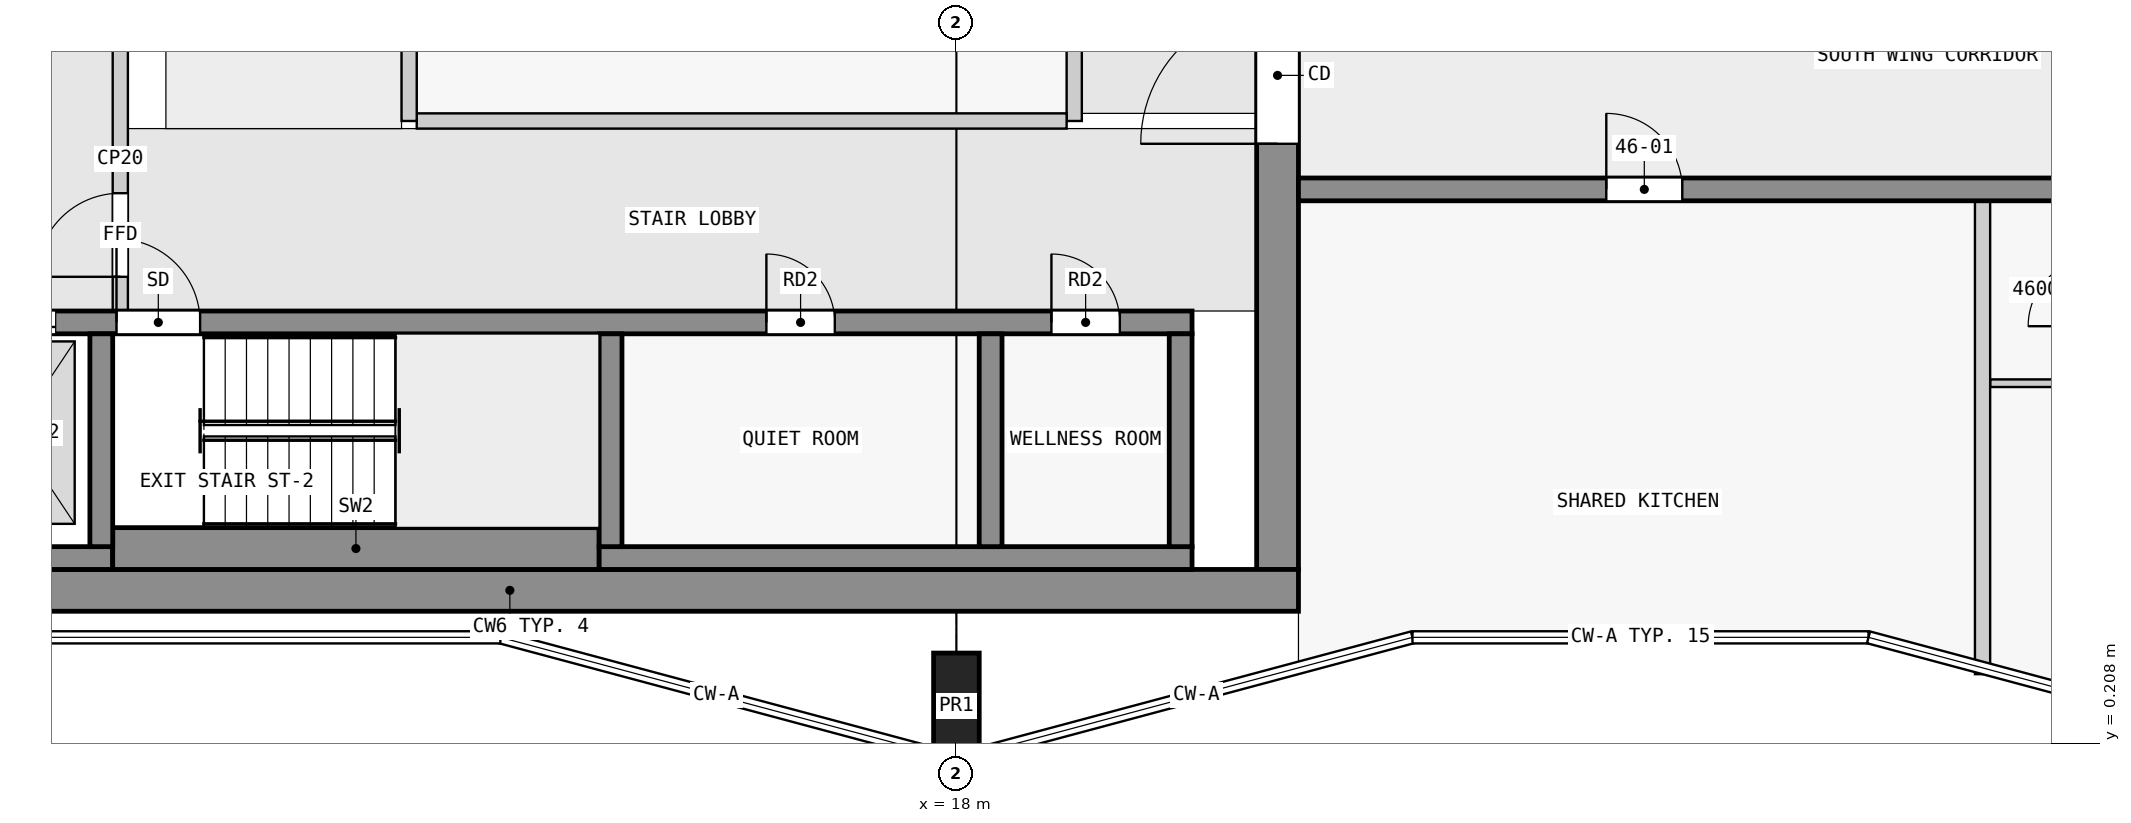
"""IFC4 building model, lengths in metres.
Left out: names, types, materials, properties, quantities, classifications, styles, units other than length and angle.
Written with IfcOpenShell. Run it as: python <this file> out.ifc"""

import sys

from ifc_helpers import new_model, si_unit, direction, frame, frame_2d, origin, origin_2d, place, context, subcontext, project, spatial, rectangle, extrude, element, fill, save


model = new_model("IFC4")
c1 = context("Model", 3, precision=1e-05, world=origin(), true_north=direction((0.0, 1.0)))
c2 = subcontext(c1, "Body", "Model", "MODEL_VIEW")
j1 = project(units=[si_unit("LENGTHUNIT", "METRE"), si_unit("PLANEANGLEUNIT", "RADIAN")], contexts=[c1])
p1 = place(None, origin())
s1 = spatial("IfcSite", under=j1, at=p1, CompositionType="ELEMENT")
p2 = place(p1, origin())
s2 = spatial("IfcBuilding", under=s1, at=p2, CompositionType="ELEMENT")
p3 = place(p2, frame((0.0, 0.0, 177.9)))
s3 = spatial("IfcBuildingStorey", under=s2, at=p3, CompositionType="ELEMENT", Elevation=177.9)
p4 = place(p3, frame((18.0, 0.7, 0.0), z_axis=(0.0, 0.0, 1.0), x_axis=(1.0, 0.0, 0.0)))
e1 = element("IfcColumn", 1, at=p4, inside=s3, PredefinedType="COLUMN", context=c2, shape_type="SweptSolid", body=[
    extrude(rectangle(XDim=0.6, YDim=1.4, at=origin_2d()), origin(), (0.0, 0.0, 1.0), 3.5),
])
p5 = place(p3, frame((1.75, 2.225, 0.0), z_axis=(0.0, 0.0, 1.0), x_axis=(1.0, 0.0, 0.0)))
e2 = element("IfcWall", 2, at=p5, inside=s3, PredefinedType="SHEAR", context=c2, shape_type="SweptSolid", body=[
    extrude(rectangle(XDim=20.75, YDim=0.55, at=frame_2d((10.375, 0.0))), origin(), (0.0, 0.0, 1.0), 3.25),
])
p6 = place(p3, frame((22.225, 2.5, 0.0), z_axis=(0.0, 0.0, 1.0), x_axis=(0.0, 1.0, 0.0)))
e3 = element("IfcWall", 3, at=p6, inside=s3, PredefinedType="SHEAR", context=c2, shape_type="SweptSolid", body=[
    extrude(rectangle(XDim=14.95, YDim=0.55, at=frame_2d((7.475, 0.0))), origin(), (0.0, 0.0, 1.0), 3.25),
])
p7 = place(p6, frame((5.6, 0.0, 0.0)))
e4 = element("IfcOpeningElement", 4, at=p7, cuts=e3, PredefinedType="OPENING", context=c2, shape_type="SweptSolid", body=[
    extrude(rectangle(XDim=1.8, YDim=2.1, at=frame_2d((0.9, 1.05))), frame((0.0, 0.285, 0.0), z_axis=(0.0, -1.0, 0.0), x_axis=(1.0, 0.0, 0.0)), (0.0, 0.0, 1.0), 0.57),
])
p8 = place(p3, frame((2.3, 2.65, 0.0), z_axis=(0.0, 0.0, 1.0), x_axis=(1.0, 0.0, 0.0)))
e5 = element("IfcWall", 5, at=p8, inside=s3, PredefinedType="SHEAR", context=c2, shape_type="SweptSolid", body=[
    extrude(rectangle(XDim=4.6, YDim=0.3, at=frame_2d((2.3, 0.0))), origin(), (0.0, 0.0, 1.0), 3.25),
])
p9 = place(p3, frame((6.9, 2.775, 0.0), z_axis=(0.0, 0.0, 1.0), x_axis=(1.0, 0.0, 0.0)))
e6 = element("IfcWall", 6, at=p9, inside=s3, PredefinedType="SHEAR", context=c2, shape_type="SweptSolid", body=[
    extrude(rectangle(XDim=6.4, YDim=0.55, at=frame_2d((3.2, 0.0))), origin(), (0.0, 0.0, 1.0), 3.25),
])
p10 = place(p3, frame((13.3, 2.65, 0.0), z_axis=(0.0, 0.0, 1.0), x_axis=(1.0, 0.0, 0.0)))
e7 = element("IfcWall", 7, at=p10, inside=s3, PredefinedType="SHEAR", context=c2, shape_type="SweptSolid", body=[
    extrude(rectangle(XDim=7.8, YDim=0.3, at=frame_2d((3.9, 0.0))), origin(), (0.0, 0.0, 1.0), 3.25),
])
for number, where, z_axis, x_axis in (
    (8, (6.75, 2.8, 0.0), (0.0, 0.0, 1.0), (0.0, 1.0, 0.0)),
    (9, (13.45, 2.8, 0.0), (0.0, 0.0, 1.0), (0.0, 1.0, 0.0)),
    (10, (18.45, 2.8, 0.0), (0.0, 0.0, 1.0), (0.0, 1.0, 0.0)),
    (11, (20.95, 2.8, 0.0), (0.0, 0.0, 1.0), (0.0, 1.0, 0.0)),
):
    element("IfcWall", number, at=place(p3, frame(where, z_axis=z_axis, x_axis=x_axis)), inside=s3, PredefinedType="SHEAR", context=c2, shape_type="SweptSolid", body=[
        extrude(rectangle(XDim=2.8, YDim=0.3, at=frame_2d((1.4, 0.0))), origin(), (0.0, 0.0, 1.0), 3.25),
    ])
p11 = place(p3, frame((2.3, 5.75, 0.0), z_axis=(0.0, 0.0, 1.0), x_axis=(1.0, 0.0, 0.0)))
e12 = element("IfcWall", 12, at=p11, inside=s3, PredefinedType="SHEAR", context=c2, shape_type="SweptSolid", body=[
    extrude(rectangle(XDim=18.8, YDim=0.3, at=frame_2d((9.4, 0.0))), origin(), (0.0, 0.0, 1.0), 3.25),
])
p12 = place(p11, frame((4.65, 0.0, 0.0)))
e13 = element("IfcOpeningElement", 13, at=p12, cuts=e12, PredefinedType="OPENING", context=c2, shape_type="SweptSolid", body=[
    extrude(rectangle(XDim=1.1, YDim=2.1, at=frame_2d((0.55, 1.05))), frame((0.0, 0.16, 0.0), z_axis=(0.0, -1.0, 0.0), x_axis=(1.0, 0.0, 0.0)), (0.0, 0.0, 1.0), 0.32),
])
p13 = place(p11, frame((0.45, 0.0, 0.0)))
e14 = element("IfcOpeningElement", 14, at=p13, cuts=e12, PredefinedType="OPENING", context=c2, shape_type="SweptSolid", body=[
    extrude(rectangle(XDim=1.1, YDim=2.1, at=frame_2d((0.55, 1.05))), frame((0.0, 0.16, 0.0), z_axis=(0.0, -1.0, 0.0), x_axis=(1.0, 0.0, 0.0)), (0.0, 0.0, 1.0), 0.32),
])
p14 = place(p11, frame((2.75, 0.0, 0.0)))
e15 = element("IfcOpeningElement", 15, at=p14, cuts=e12, PredefinedType="OPENING", context=c2, shape_type="SweptSolid", body=[
    extrude(rectangle(XDim=1.1, YDim=2.1, at=frame_2d((0.55, 1.05))), frame((0.0, 0.16, 0.0), z_axis=(0.0, -1.0, 0.0), x_axis=(1.0, 0.0, 0.0)), (0.0, 0.0, 1.0), 0.32),
])
p15 = place(p11, frame((13.2, 0.0, 0.0)))
e16 = element("IfcOpeningElement", 16, at=p15, cuts=e12, PredefinedType="OPENING", context=c2, shape_type="SweptSolid", body=[
    extrude(rectangle(XDim=0.9, YDim=2.1, at=frame_2d((0.45, 1.05))), frame((0.0, 0.16, 0.0), z_axis=(0.0, -1.0, 0.0), x_axis=(1.0, 0.0, 0.0)), (0.0, 0.0, 1.0), 0.32),
])
p16 = place(p11, frame((16.95, 0.0, 0.0)))
e17 = element("IfcOpeningElement", 17, at=p16, cuts=e12, PredefinedType="OPENING", context=c2, shape_type="SweptSolid", body=[
    extrude(rectangle(XDim=0.9, YDim=2.1, at=frame_2d((0.45, 1.05))), frame((0.0, 0.16, 0.0), z_axis=(0.0, -1.0, 0.0), x_axis=(1.0, 0.0, 0.0)), (0.0, 0.0, 1.0), 0.32),
])
p17 = place(p3, frame((22.5, 7.5, 0.0), z_axis=(0.0, 0.0, 1.0), x_axis=(1.0, 0.0, 0.0)))
e18 = element("IfcWall", 18, at=p17, inside=s3, PredefinedType="SHEAR", context=c2, shape_type="SweptSolid", body=[
    extrude(rectangle(XDim=22.5, YDim=0.3, at=frame_2d((11.25, 0.0))), origin(), (0.0, 0.0, 1.0), 3.25),
])
p18 = place(p17, frame((4.05, 0.0, 0.0)))
e19 = element("IfcOpeningElement", 19, at=p18, cuts=e18, PredefinedType="OPENING", context=c2, shape_type="SweptSolid", body=[
    extrude(rectangle(XDim=1.0, YDim=2.1, at=frame_2d((0.5, 1.05))), frame((0.0, 0.16, 0.0), z_axis=(0.0, -1.0, 0.0), x_axis=(1.0, 0.0, 0.0)), (0.0, 0.0, 1.0), 0.32),
])
p19 = place(p17, frame((10.75, 0.0, 0.0)))
e20 = element("IfcOpeningElement", 20, at=p19, cuts=e18, PredefinedType="OPENING", context=c2, shape_type="SweptSolid", body=[
    extrude(rectangle(XDim=1.0, YDim=2.1, at=frame_2d((0.5, 1.05))), frame((0.0, 0.16, 0.0), z_axis=(0.0, -1.0, 0.0), x_axis=(1.0, 0.0, 0.0)), (0.0, 0.0, 1.0), 0.32),
])
p20 = place(p17, frame((15.35, 0.0, 0.0)))
e21 = element("IfcOpeningElement", 21, at=p20, cuts=e18, PredefinedType="OPENING", context=c2, shape_type="SweptSolid", body=[
    extrude(rectangle(XDim=0.9, YDim=2.1, at=frame_2d((0.45, 1.05))), frame((0.0, 0.16, 0.0), z_axis=(0.0, -1.0, 0.0), x_axis=(1.0, 0.0, 0.0)), (0.0, 0.0, 1.0), 0.32),
])
p21 = place(p17, frame((18.75, 0.0, 0.0)))
e22 = element("IfcOpeningElement", 22, at=p21, cuts=e18, PredefinedType="OPENING", context=c2, shape_type="SweptSolid", body=[
    extrude(rectangle(XDim=0.9, YDim=2.1, at=frame_2d((0.45, 1.05))), frame((0.0, 0.16, 0.0), z_axis=(0.0, -1.0, 0.0), x_axis=(1.0, 0.0, 0.0)), (0.0, 0.0, 1.0), 0.32),
])
p22 = place(p17, frame((20.95, 0.0, 0.0)))
e23 = element("IfcOpeningElement", 23, at=p22, cuts=e18, PredefinedType="OPENING", context=c2, shape_type="SweptSolid", body=[
    extrude(rectangle(XDim=1.0, YDim=2.1, at=frame_2d((0.5, 1.05))), frame((0.0, 0.16, 0.0), z_axis=(0.0, -1.0, 0.0), x_axis=(1.0, 0.0, 0.0)), (0.0, 0.0, 1.0), 0.32),
])
p23 = place(p3, frame((7.0, 5.9, 0.0), z_axis=(0.0, 0.0, 1.0), x_axis=(0.0, 1.0, 0.0)))
e24 = element("IfcWall", 24, at=p23, inside=s3, PredefinedType="PARTITIONING", context=c2, shape_type="SweptSolid", body=[
    extrude(rectangle(XDim=4.0, YDim=0.2, at=frame_2d((2.0, 0.0))), origin(), (0.0, 0.0, 1.0), 3.25),
])
p24 = place(p23, frame((0.45, 0.0, 0.0)))
e25 = element("IfcOpeningElement", 25, at=p24, cuts=e24, PredefinedType="OPENING", context=c2, shape_type="SweptSolid", body=[
    extrude(rectangle(XDim=1.1, YDim=2.1, at=frame_2d((0.55, 1.05))), frame((0.0, 0.11, 0.0), z_axis=(0.0, -1.0, 0.0), x_axis=(1.0, 0.0, 0.0)), (0.0, 0.0, 1.0), 0.22),
])
p25 = place(p3, frame((10.8, 8.4, 0.0), z_axis=(0.0, 0.0, 1.0), x_axis=(0.0, 1.0, 0.0)))
e26 = element("IfcWall", 26, at=p25, inside=s3, PredefinedType="PARTITIONING", context=c2, shape_type="SweptSolid", body=[
    extrude(rectangle(XDim=3.8, YDim=0.2, at=frame_2d((1.9, 0.0))), origin(), (0.0, 0.0, 1.0), 3.25),
])
p26 = place(p3, frame((10.9, 8.4, 0.0), z_axis=(0.0, 0.0, 1.0), x_axis=(1.0, 0.0, 0.0)))
e27 = element("IfcWall", 27, at=p26, inside=s3, PredefinedType="PARTITIONING", context=c2, shape_type="SweptSolid", body=[
    extrude(rectangle(XDim=8.55, YDim=0.2, at=frame_2d((4.275, 0.0))), origin(), (0.0, 0.0, 1.0), 3.25),
])
p27 = place(p3, frame((19.55, 8.4, 0.0), z_axis=(0.0, 0.0, 1.0), x_axis=(0.0, 1.0, 0.0)))
e28 = element("IfcWall", 28, at=p27, inside=s3, PredefinedType="PARTITIONING", context=c2, shape_type="SweptSolid", body=[
    extrude(rectangle(XDim=3.8, YDim=0.2, at=frame_2d((1.9, 0.0))), origin(), (0.0, 0.0, 1.0), 3.25),
])
p28 = place(p3, frame((31.6, 4.95, 0.0), z_axis=(0.0, 0.0, 1.0), x_axis=(1.0, 0.0, 0.0)))
e29 = element("IfcWall", 29, at=p28, inside=s3, PredefinedType="PARTITIONING", context=c2, shape_type="SweptSolid", body=[
    extrude(rectangle(XDim=1.35, YDim=0.1, at=frame_2d((0.675, 0.0))), origin(), (0.0, 0.0, 1.0), 3.25),
])
p29 = place(p3, frame((31.5, 1.122, 0.0), z_axis=(0.0, 0.0, 1.0), x_axis=(0.0, 1.0, 0.0)))
e30 = element("IfcWall", 30, at=p29, inside=s3, PredefinedType="PARTITIONING", context=c2, shape_type="SweptSolid", body=[
    extrude(rectangle(XDim=6.228, YDim=0.2, at=frame_2d((3.114, 0.0))), origin(), (0.0, 0.0, 1.0), 3.25),
])
p30 = place(p24, origin())
e31 = element("IfcDoor", 31, at=p30, inside=s3, OperationType="SINGLE_SWING_LEFT", PredefinedType="DOOR", context=c2, shape_type="SweptSolid", body=[
    extrude(rectangle(XDim=1.1, YDim=2.1, at=frame_2d((0.55, 1.05))), frame((0.0, 0.025, 0.0), z_axis=(0.0, -1.0, 0.0), x_axis=(1.0, 0.0, 0.0)), (0.0, 0.0, 1.0), 0.05),
])
fill(e25, e31)
p31 = place(p12, origin())
e32 = element("IfcDoor", 32, at=p31, inside=s3, OperationType="SINGLE_SWING_LEFT", PredefinedType="DOOR", context=c2, shape_type="SweptSolid", body=[
    extrude(rectangle(XDim=1.1, YDim=2.1, at=frame_2d((0.55, 1.05))), frame((0.0, 0.025, 0.0), z_axis=(0.0, -1.0, 0.0), x_axis=(1.0, 0.0, 0.0)), (0.0, 0.0, 1.0), 0.05),
])
fill(e13, e32)
p32 = place(p14, origin())
e33 = element("IfcDoor", 33, at=p32, inside=s3, OperationType="DOUBLE_DOOR_SLIDING", PredefinedType="DOOR", context=c2, shape_type="SweptSolid", body=[
    extrude(rectangle(XDim=1.1, YDim=2.1, at=frame_2d((0.55, 1.05))), frame((0.0, 0.025, 0.0), z_axis=(0.0, -1.0, 0.0), x_axis=(1.0, 0.0, 0.0)), (0.0, 0.0, 1.0), 0.05),
])
fill(e15, e33)
p33 = place(p7, origin())
e34 = element("IfcDoor", 34, at=p33, inside=s3, OperationType="DOUBLE_DOOR_SINGLE_SWING", PredefinedType="DOOR", context=c2, shape_type="SweptSolid", body=[
    extrude(rectangle(XDim=1.8, YDim=2.1, at=frame_2d((0.9, 1.05))), frame((0.0, 0.025, 0.0), z_axis=(0.0, -1.0, 0.0), x_axis=(1.0, 0.0, 0.0)), (0.0, 0.0, 1.0), 0.05),
])
fill(e4, e34)
p34 = place(p15, origin())
e35 = element("IfcDoor", 35, at=p34, inside=s3, OperationType="SINGLE_SWING_LEFT", PredefinedType="DOOR", context=c2, shape_type="SweptSolid", body=[
    extrude(rectangle(XDim=0.9, YDim=2.1, at=frame_2d((0.45, 1.05))), frame((0.0, 0.025, 0.0), z_axis=(0.0, -1.0, 0.0), x_axis=(1.0, 0.0, 0.0)), (0.0, 0.0, 1.0), 0.05),
])
fill(e16, e35)
p35 = place(p16, origin())
e36 = element("IfcDoor", 36, at=p35, inside=s3, OperationType="SINGLE_SWING_LEFT", PredefinedType="DOOR", context=c2, shape_type="SweptSolid", body=[
    extrude(rectangle(XDim=0.9, YDim=2.1, at=frame_2d((0.45, 1.05))), frame((0.0, 0.025, 0.0), z_axis=(0.0, -1.0, 0.0), x_axis=(1.0, 0.0, 0.0)), (0.0, 0.0, 1.0), 0.05),
])
fill(e17, e36)
p36 = place(p18, origin())
e37 = element("IfcDoor", 37, at=p36, inside=s3, OperationType="SINGLE_SWING_LEFT", PredefinedType="DOOR", context=c2, shape_type="SweptSolid", body=[
    extrude(rectangle(XDim=1.0, YDim=2.1, at=frame_2d((0.5, 1.05))), frame((0.0, 0.025, 0.0), z_axis=(0.0, -1.0, 0.0), x_axis=(1.0, 0.0, 0.0)), (0.0, 0.0, 1.0), 0.05),
])
fill(e19, e37)
save(model, sys.argv[1])
